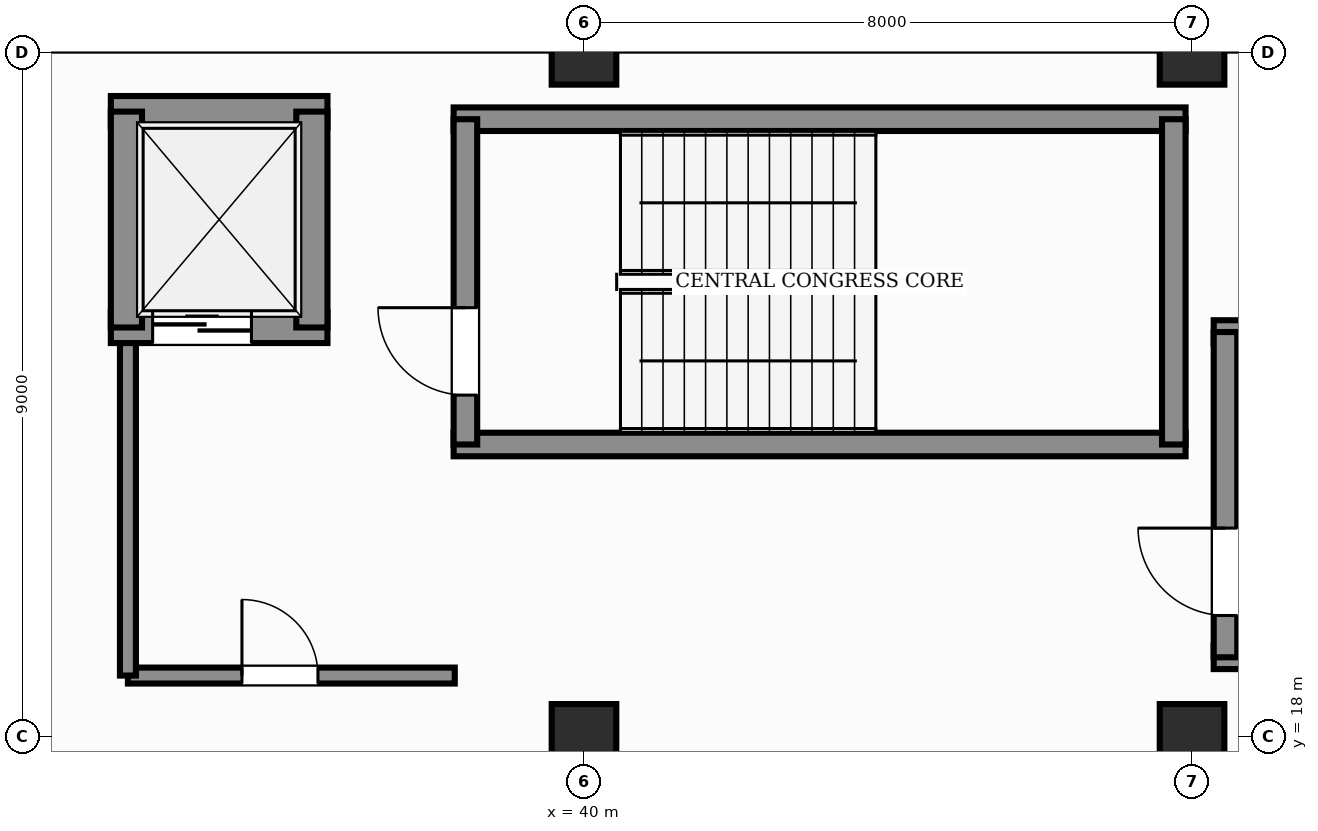
"""IFC4 building model, lengths in metres.
Left out: names, types, materials, properties, quantities, classifications, styles, units other than length and angle.
Written with IfcOpenShell. Run it as: python <this file> out.ifc"""

import sys

from ifc_helpers import new_model, si_unit, direction, frame, frame_2d, origin, origin_2d, place, context, subcontext, project, spatial, rectangle, extrude, element, fill, save


model = new_model("IFC4")
c1 = context("Model", 3, precision=1e-05, world=origin(), true_north=direction((0.0, 1.0)))
c2 = subcontext(c1, "Body", "Model", "MODEL_VIEW")
j1 = project(units=[si_unit("LENGTHUNIT", "METRE"), si_unit("PLANEANGLEUNIT", "RADIAN")], contexts=[c1])
p1 = place(None, origin())
s1 = spatial("IfcSite", under=j1, at=p1, CompositionType="ELEMENT")
p2 = place(p1, origin())
s2 = spatial("IfcBuilding", under=s1, at=p2, CompositionType="ELEMENT")
p3 = place(p2, frame((0.0, 0.0, -4.8)))
s3 = spatial("IfcBuildingStorey", under=s2, at=p3, CompositionType="ELEMENT", Elevation=-4.8)
for number, where, z_axis, x_axis in (
    (1, (40.0, 18.0, 0.0), (0.0, 0.0, 1.0), (1.0, 0.0, 0.0)),
    (2, (40.0, 27.0, 0.0), (0.0, 0.0, 1.0), (1.0, 0.0, 0.0)),
    (3, (48.0, 18.0, 0.0), (0.0, 0.0, 1.0), (1.0, 0.0, 0.0)),
    (4, (48.0, 27.0, 0.0), (0.0, 0.0, 1.0), (1.0, 0.0, 0.0)),
):
    element("IfcColumn", number, at=place(p3, frame(where, z_axis=z_axis, x_axis=x_axis)), inside=s3, PredefinedType="COLUMN", context=c2, shape_type="SweptSolid", body=[
        extrude(rectangle(XDim=0.85, YDim=0.85, at=origin_2d()), origin(), (0.0, 0.0, 1.0), 4.8),
    ])
for number, where, z_axis, x_axis in (
    (5, (38.285, 21.84, 0.0), (0.0, 0.0, 1.0), (1.0, 0.0, 0.0)),
    (6, (38.285, 26.12, 0.0), (0.0, 0.0, 1.0), (1.0, 0.0, 0.0)),
):
    element("IfcWall", number, at=place(p3, frame(where, z_axis=z_axis, x_axis=x_axis)), inside=s3, PredefinedType="SHEAR", context=c2, shape_type="SweptSolid", body=[
        extrude(rectangle(XDim=9.63, YDim=0.31, at=frame_2d((4.815, 0.0))), origin(), (0.0, 0.0, 1.0), 4.8),
    ])
p4 = place(p3, frame((38.44, 21.84, 0.0), z_axis=(0.0, 0.0, 1.0), x_axis=(0.0, 1.0, 0.0)))
e7 = element("IfcWall", 7, at=p4, inside=s3, PredefinedType="SHEAR", context=c2, shape_type="SweptSolid", body=[
    extrude(rectangle(XDim=4.28, YDim=0.31, at=frame_2d((2.14, 0.0))), origin(), (0.0, 0.0, 1.0), 4.8),
])
p5 = place(p4, frame((0.65, 0.0, 0.0)))
e8 = element("IfcOpeningElement", 8, at=p5, cuts=e7, PredefinedType="OPENING", context=c2, shape_type="SweptSolid", body=[
    extrude(rectangle(XDim=1.15, YDim=2.2, at=frame_2d((0.575, 1.1))), frame((0.0, 0.165, 0.0), z_axis=(0.0, -1.0, 0.0), x_axis=(1.0, 0.0, 0.0)), (0.0, 0.0, 1.0), 0.33),
])
p6 = place(p3, frame((47.76, 21.84, 0.0), z_axis=(0.0, 0.0, 1.0), x_axis=(0.0, 1.0, 0.0)))
e9 = element("IfcWall", 9, at=p6, inside=s3, PredefinedType="SHEAR", context=c2, shape_type="SweptSolid", body=[
    extrude(rectangle(XDim=4.28, YDim=0.31, at=frame_2d((2.14, 0.0))), origin(), (0.0, 0.0, 1.0), 4.8),
])
p7 = place(p3, frame((34.0, 18.8, 0.0), z_axis=(0.0, 0.0, 1.0), x_axis=(1.0, 0.0, 0.0)))
e10 = element("IfcWall", 10, at=p7, inside=s3, PredefinedType="PARTITIONING", context=c2, shape_type="SweptSolid", body=[
    extrude(rectangle(XDim=4.3, YDim=0.21, at=frame_2d((2.15, 0.0))), origin(), (0.0, 0.0, 1.0), 3.25),
])
p8 = place(p7, frame((1.5, 0.0, 0.0)))
e11 = element("IfcOpeningElement", 11, at=p8, cuts=e10, PredefinedType="OPENING", context=c2, shape_type="SweptSolid", body=[
    extrude(rectangle(XDim=1.0, YDim=2.15, at=frame_2d((0.5, 1.075))), frame((0.0, 0.115, 0.0), z_axis=(0.0, -1.0, 0.0), x_axis=(1.0, 0.0, 0.0)), (0.0, 0.0, 1.0), 0.23),
])
p9 = place(p3, frame((34.0, 18.8, 0.0), z_axis=(0.0, 0.0, 1.0), x_axis=(0.0, 1.0, 0.0)))
e12 = element("IfcWall", 12, at=p9, inside=s3, PredefinedType="PARTITIONING", context=c2, shape_type="SweptSolid", body=[
    extrude(rectangle(XDim=4.6, YDim=0.21, at=frame_2d((2.3, 0.0))), origin(), (0.0, 0.0, 1.0), 3.25),
])
p10 = place(p3, frame((33.775, 23.38, 0.0), z_axis=(0.0, 0.0, 1.0), x_axis=(1.0, 0.0, 0.0)))
e13 = element("IfcWall", 13, at=p10, inside=s3, PredefinedType="SHEAR", context=c2, shape_type="SweptSolid", body=[
    extrude(rectangle(XDim=2.85, YDim=0.41, at=frame_2d((1.425, 0.0))), origin(), (0.0, 0.0, 1.0), 4.8),
])
p11 = place(p10, frame((0.55, 0.0, 0.0)))
e14 = element("IfcOpeningElement", 14, at=p11, cuts=e13, PredefinedType="OPENING", context=c2, shape_type="SweptSolid", body=[
    extrude(rectangle(XDim=1.3, YDim=2.25, at=frame_2d((0.65, 1.125))), frame((0.0, 0.215, 0.0), z_axis=(0.0, -1.0, 0.0), x_axis=(1.0, 0.0, 0.0)), (0.0, 0.0, 1.0), 0.43),
])
p12 = place(p3, frame((33.775, 26.22, 0.0), z_axis=(0.0, 0.0, 1.0), x_axis=(1.0, 0.0, 0.0)))
e15 = element("IfcWall", 15, at=p12, inside=s3, PredefinedType="SHEAR", context=c2, shape_type="SweptSolid", body=[
    extrude(rectangle(XDim=2.85, YDim=0.41, at=frame_2d((1.425, 0.0))), origin(), (0.0, 0.0, 1.0), 4.8),
])
for number, where, z_axis, x_axis in (
    (16, (33.98, 23.38, 0.0), (0.0, 0.0, 1.0), (0.0, 1.0, 0.0)),
    (17, (36.42, 23.38, 0.0), (0.0, 0.0, 1.0), (0.0, 1.0, 0.0)),
):
    element("IfcWall", number, at=place(p3, frame(where, z_axis=z_axis, x_axis=x_axis)), inside=s3, PredefinedType="SHEAR", context=c2, shape_type="SweptSolid", body=[
        extrude(rectangle(XDim=2.84, YDim=0.41, at=frame_2d((1.42, 0.0))), origin(), (0.0, 0.0, 1.0), 4.8),
    ])
for number, where, z_axis, x_axis in (
    (18, (48.285, 19.04, 0.0), (0.0, 0.0, 1.0), (1.0, 0.0, 0.0)),
    (19, (48.285, 23.32, 0.0), (0.0, 0.0, 1.0), (1.0, 0.0, 0.0)),
):
    element("IfcWall", number, at=place(p3, frame(where, z_axis=z_axis, x_axis=x_axis)), inside=s3, PredefinedType="SHEAR", context=c2, shape_type="SweptSolid", body=[
        extrude(rectangle(XDim=9.63, YDim=0.31, at=frame_2d((4.815, 0.0))), origin(), (0.0, 0.0, 1.0), 4.8),
    ])
p13 = place(p3, frame((48.44, 19.04, 0.0), z_axis=(0.0, 0.0, 1.0), x_axis=(0.0, 1.0, 0.0)))
e20 = element("IfcWall", 20, at=p13, inside=s3, PredefinedType="SHEAR", context=c2, shape_type="SweptSolid", body=[
    extrude(rectangle(XDim=4.28, YDim=0.31, at=frame_2d((2.14, 0.0))), origin(), (0.0, 0.0, 1.0), 4.8),
])
p14 = place(p13, frame((0.55, 0.0, 0.0)))
e21 = element("IfcOpeningElement", 21, at=p14, cuts=e20, PredefinedType="OPENING", context=c2, shape_type="SweptSolid", body=[
    extrude(rectangle(XDim=1.15, YDim=2.2, at=frame_2d((0.575, 1.1))), frame((0.0, 0.165, 0.0), z_axis=(0.0, -1.0, 0.0), x_axis=(1.0, 0.0, 0.0)), (0.0, 0.0, 1.0), 0.33),
])
p15 = place(p5, origin())
e22 = element("IfcDoor", 22, at=p15, inside=s3, OperationType="SINGLE_SWING_RIGHT", PredefinedType="DOOR", context=c2, shape_type="SweptSolid", body=[
    extrude(rectangle(XDim=1.15, YDim=2.2, at=frame_2d((0.575, 1.1))), frame((0.0, 0.025, 0.0), z_axis=(0.0, -1.0, 0.0), x_axis=(1.0, 0.0, 0.0)), (0.0, 0.0, 1.0), 0.05),
])
fill(e8, e22)
p16 = place(p8, origin())
e23 = element("IfcDoor", 23, at=p16, inside=s3, OperationType="SINGLE_SWING_LEFT", PredefinedType="DOOR", context=c2, shape_type="SweptSolid", body=[
    extrude(rectangle(XDim=1.0, YDim=2.15, at=frame_2d((0.5, 1.075))), frame((0.0, 0.025, 0.0), z_axis=(0.0, -1.0, 0.0), x_axis=(1.0, 0.0, 0.0)), (0.0, 0.0, 1.0), 0.05),
])
fill(e11, e23)
p17 = place(p11, origin())
e24 = element("IfcDoor", 24, at=p17, inside=s3, OperationType="DOUBLE_DOOR_SLIDING", PredefinedType="DOOR", context=c2, shape_type="SweptSolid", body=[
    extrude(rectangle(XDim=1.3, YDim=2.25, at=frame_2d((0.65, 1.125))), frame((0.0, 0.025, 0.0), z_axis=(0.0, -1.0, 0.0), x_axis=(1.0, 0.0, 0.0)), (0.0, 0.0, 1.0), 0.05),
])
fill(e14, e24)
p18 = place(p14, origin())
e25 = element("IfcDoor", 25, at=p18, inside=s3, OperationType="SINGLE_SWING_RIGHT", PredefinedType="DOOR", context=c2, shape_type="SweptSolid", body=[
    extrude(rectangle(XDim=1.15, YDim=2.2, at=frame_2d((0.575, 1.1))), frame((0.0, 0.025, 0.0), z_axis=(0.0, -1.0, 0.0), x_axis=(1.0, 0.0, 0.0)), (0.0, 0.0, 1.0), 0.05),
])
fill(e21, e25)
save(model, sys.argv[1])
